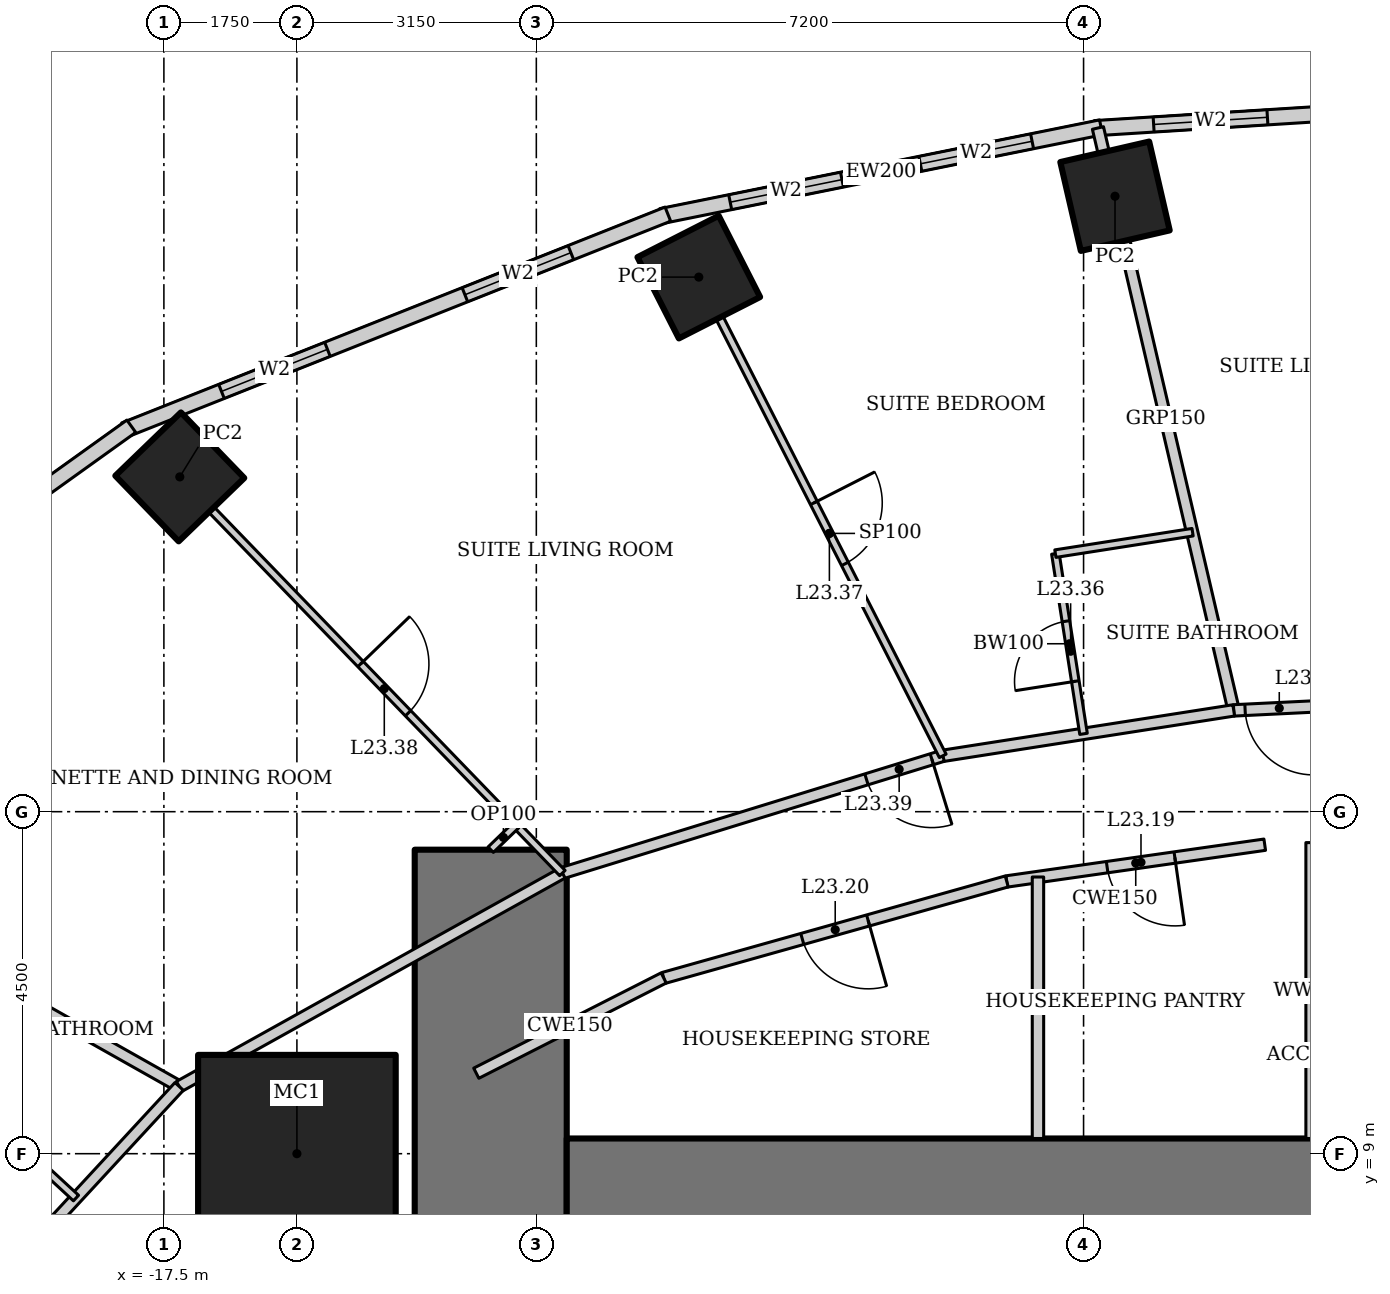
"""IFC4 building model, lengths in metres.
Left out: names, types, materials, properties, quantities, classifications, styles, units other than length and angle.
Written with IfcOpenShell. Run it as: python <this file> out.ifc"""

import sys

from ifc_helpers import new_model, si_unit, direction, frame, frame_2d, origin, origin_2d, place, context, subcontext, project, spatial, rectangle, hollow_rectangle, extrude, element, fill, save


model = new_model("IFC4")
c1 = context("Model", 3, precision=1e-05, world=origin(), true_north=direction((0.0, 1.0)))
c2 = subcontext(c1, "Body", "Model", "MODEL_VIEW")
j1 = project(units=[si_unit("LENGTHUNIT", "METRE"), si_unit("PLANEANGLEUNIT", "RADIAN")], contexts=[c1])
p1 = place(None, origin())
s1 = spatial("IfcSite", under=j1, at=p1, CompositionType="ELEMENT")
p2 = place(p1, origin())
s2 = spatial("IfcBuilding", under=s1, at=p2, CompositionType="ELEMENT")
p3 = place(p2, frame((0.0, 0.0, 98.2)))
s3 = spatial("IfcBuildingStorey", under=s2, at=p3, CompositionType="ELEMENT", Elevation=98.2)
p4 = place(p3, frame((-15.75, 9.0, 0.0), z_axis=(0.0, 0.0, 1.0), x_axis=(1.0, 0.0, 0.0)))
e1 = element("IfcColumn", 1, at=p4, inside=s3, PredefinedType="COLUMN", context=c2, shape_type="SweptSolid", body=[
    extrude(hollow_rectangle(XDim=2.6, YDim=2.6, WallThickness=0.13, at=origin_2d()), origin(), (0.0, 0.0, 1.0), 3.6),
])
for number, where, z_axis, x_axis in (
    (2, (-4.986, 21.598, 0.0), (0.0, 0.0, 1.0), (0.974, 0.225, 0.0)),
    (3, (-10.463, 20.534, 0.0), (0.0, 0.0, 1.0), (0.891, 0.454, 0.0)),
    (4, (-17.291, 17.905, 0.0), (0.0, 0.0, 1.0), (0.719, 0.695, 0.0)),
):
    element("IfcColumn", number, at=place(p3, frame(where, z_axis=z_axis, x_axis=x_axis)), inside=s3, PredefinedType="COLUMN", context=c2, shape_type="SweptSolid", body=[
        extrude(hollow_rectangle(XDim=1.2, YDim=1.2, WallThickness=0.1, at=origin_2d()), origin(), (0.0, 0.0, 1.0), 3.6),
    ])
p5 = place(p3, frame((-13.2, 13.0, 0.0), z_axis=(0.0, 0.0, 1.0), x_axis=(0.0, -1.0, 0.0)))
e5 = element("IfcWall", 5, at=p5, inside=s3, PredefinedType="SHEAR", context=c2, shape_type="SweptSolid", body=[
    extrude(rectangle(XDim=26.0, YDim=2.0, at=frame_2d((13.0, 0.0))), origin(), (0.0, 0.0, 1.0), 3.6),
])
p6 = place(p5, frame((12.1, 0.0, 0.0)))
e6 = element("IfcOpeningElement", 6, at=p6, cuts=e5, PredefinedType="OPENING", context=c2, shape_type="SweptSolid", body=[
    extrude(rectangle(XDim=1.8, YDim=2.1, at=frame_2d((0.9, 1.05))), frame((0.0, 1.01, 0.0), z_axis=(0.0, -1.0, 0.0), x_axis=(1.0, 0.0, 0.0)), (0.0, 0.0, 1.0), 2.02),
])
p7 = place(p3, frame((12.2, 8.0, 0.0), z_axis=(0.0, 0.0, 1.0), x_axis=(-1.0, 0.0, 0.0)))
e7 = element("IfcWall", 7, at=p7, inside=s3, PredefinedType="SHEAR", context=c2, shape_type="SweptSolid", body=[
    extrude(rectangle(XDim=24.4, YDim=2.4, at=frame_2d((12.2, 0.0))), origin(), (0.0, 0.0, 1.0), 3.6),
])
p8 = place(p3, frame((0.041, 22.827, 0.0), z_axis=(0.0, 0.0, 1.0), x_axis=(-0.998018582375, -0.062919863585, 0.0)))
e8 = element("IfcWall", 8, at=p8, inside=s3, PredefinedType="SOLIDWALL", context=c2, shape_type="SweptSolid", body=[
    extrude(rectangle(XDim=5.304, YDim=0.2, at=frame_2d((2.652, 0.0))), origin(), (0.0, 0.0, 1.0), 3.45),
])
p9 = place(p8, frame((0.776, 0.0, 0.5)))
e9 = element("IfcOpeningElement", 9, at=p9, cuts=e8, PredefinedType="OPENING", context=c2, shape_type="SweptSolid", body=[
    extrude(rectangle(XDim=1.5, YDim=2.2, at=frame_2d((0.75, 1.1))), frame((0.0, 0.11, 0.0), z_axis=(0.0, -1.0, 0.0), x_axis=(1.0, 0.0, 0.0)), (0.0, 0.0, 1.0), 0.22),
])
p10 = place(p8, frame((3.028, 0.0, 0.5)))
e10 = element("IfcOpeningElement", 10, at=p10, cuts=e8, PredefinedType="OPENING", context=c2, shape_type="SweptSolid", body=[
    extrude(rectangle(XDim=1.5, YDim=2.2, at=frame_2d((0.75, 1.1))), frame((0.0, 0.11, 0.0), z_axis=(0.0, -1.0, 0.0), x_axis=(1.0, 0.0, 0.0)), (0.0, 0.0, 1.0), 0.22),
])
p11 = place(p3, frame((-5.17, 22.504, 0.0), z_axis=(0.0, 0.0, 1.0), x_axis=(-0.980251657452, -0.197754110105, 0.0)))
e11 = element("IfcWall", 11, at=p11, inside=s3, PredefinedType="SOLIDWALL", context=c2, shape_type="SweptSolid", body=[
    extrude(rectangle(XDim=5.904, YDim=0.2, at=frame_2d((2.952, 0.0))), origin(), (0.0, 0.0, 1.0), 3.45),
])
p12 = place(p11, frame((0.926, 0.0, 0.5)))
e12 = element("IfcOpeningElement", 12, at=p12, cuts=e11, PredefinedType="OPENING", context=c2, shape_type="SweptSolid", body=[
    extrude(rectangle(XDim=1.5, YDim=2.2, at=frame_2d((0.75, 1.1))), frame((0.0, 0.11, 0.0), z_axis=(0.0, -1.0, 0.0), x_axis=(1.0, 0.0, 0.0)), (0.0, 0.0, 1.0), 0.22),
])
p13 = place(p11, frame((3.478, 0.0, 0.5)))
e13 = element("IfcOpeningElement", 13, at=p13, cuts=e11, PredefinedType="OPENING", context=c2, shape_type="SweptSolid", body=[
    extrude(rectangle(XDim=1.5, YDim=2.2, at=frame_2d((0.75, 1.1))), frame((0.0, 0.11, 0.0), z_axis=(0.0, -1.0, 0.0), x_axis=(1.0, 0.0, 0.0)), (0.0, 0.0, 1.0), 0.22),
])
p14 = place(p3, frame((-10.869, 21.363, 0.0), z_axis=(0.0, 0.0, 1.0), x_axis=(-0.929358351251, -0.369178892895, 0.0)))
e14 = element("IfcWall", 14, at=p14, inside=s3, PredefinedType="SOLIDWALL", context=c2, shape_type="SweptSolid", body=[
    extrude(rectangle(XDim=7.692, YDim=0.2, at=frame_2d((3.846, 0.0))), origin(), (0.0, 0.0, 1.0), 3.45),
])
p15 = place(p14, frame((1.373, 0.0, 0.5)))
e15 = element("IfcOpeningElement", 15, at=p15, cuts=e14, PredefinedType="OPENING", context=c2, shape_type="SweptSolid", body=[
    extrude(rectangle(XDim=1.5, YDim=2.2, at=frame_2d((0.75, 1.1))), frame((0.0, 0.11, 0.0), z_axis=(0.0, -1.0, 0.0), x_axis=(1.0, 0.0, 0.0)), (0.0, 0.0, 1.0), 0.22),
])
p16 = place(p14, frame((4.819, 0.0, 0.5)))
e16 = element("IfcOpeningElement", 16, at=p16, cuts=e14, PredefinedType="OPENING", context=c2, shape_type="SweptSolid", body=[
    extrude(rectangle(XDim=1.5, YDim=2.2, at=frame_2d((0.75, 1.1))), frame((0.0, 0.11, 0.0), z_axis=(0.0, -1.0, 0.0), x_axis=(1.0, 0.0, 0.0)), (0.0, 0.0, 1.0), 0.22),
])
p17 = place(p3, frame((-17.929, 18.572, 0.0), z_axis=(0.0, 0.0, 1.0), x_axis=(-0.812791321576, -0.582554948112, 0.0)))
e17 = element("IfcWall", 17, at=p17, inside=s3, PredefinedType="SOLIDWALL", context=c2, shape_type="SweptSolid", body=[
    extrude(rectangle(XDim=8.063, YDim=0.2, at=frame_2d((4.032, 0.0))), origin(), (0.0, 0.0, 1.0), 3.45),
])
p18 = place(p17, frame((1.466, 0.0, 0.5)))
e18 = element("IfcOpeningElement", 18, at=p18, cuts=e17, PredefinedType="OPENING", context=c2, shape_type="SweptSolid", body=[
    extrude(rectangle(XDim=1.5, YDim=2.2, at=frame_2d((0.75, 1.1))), frame((0.0, 0.11, 0.0), z_axis=(0.0, -1.0, 0.0), x_axis=(1.0, 0.0, 0.0)), (0.0, 0.0, 1.0), 0.22),
])
p19 = place(p17, frame((5.097, 0.0, 0.5)))
e19 = element("IfcOpeningElement", 19, at=p19, cuts=e17, PredefinedType="OPENING", context=c2, shape_type="SweptSolid", body=[
    extrude(rectangle(XDim=1.5, YDim=2.2, at=frame_2d((0.75, 1.1))), frame((0.0, 0.11, 0.0), z_axis=(0.0, -1.0, 0.0), x_axis=(1.0, 0.0, 0.0)), (0.0, 0.0, 1.0), 0.22),
])
p20 = place(p3, frame((-5.211, 22.496, 0.0), z_axis=(0.0, 0.0, 1.0), x_axis=(0.227056984461, -0.973881474209, 0.0)))
e20 = element("IfcWall", 20, at=p20, inside=s3, PredefinedType="PARTITIONING", context=c2, shape_type="SweptSolid", body=[
    extrude(rectangle(XDim=7.869, YDim=0.15, at=frame_2d((3.934, 0.0))), origin(), (0.0, 0.0, 1.0), 2.767),
])
p21 = place(p3, frame((-24.435, 13.909, 0.0), z_axis=(0.0, 0.0, 1.0), x_axis=(0.871075246657, -0.491149584813, 0.0)))
e21 = element("IfcWall", 21, at=p21, inside=s3, PredefinedType="PARTITIONING", context=c2, shape_type="SweptSolid", body=[
    extrude(rectangle(XDim=8.192, YDim=0.15, at=frame_2d((4.096, 0.0))), origin(), (0.0, 0.0, 1.0), 2.693),
])
p22 = place(p3, frame((0.0, 15.0, 0.0), z_axis=(0.0, 0.0, 1.0), x_axis=(-0.998809560203, -0.048779733975, 0.0)))
e22 = element("IfcWall", 22, at=p22, inside=s3, PredefinedType="PARTITIONING", context=c2, shape_type="SweptSolid", body=[
    extrude(rectangle(XDim=3.428, YDim=0.15, at=frame_2d((1.714, 0.0))), origin(), (0.0, 0.0, 1.0), 3.45),
])
p23 = place(p22, frame((2.378, 0.0, 0.0)))
e23 = element("IfcOpeningElement", 23, at=p23, cuts=e22, PredefinedType="OPENING", context=c2, shape_type="SweptSolid", body=[
    extrude(rectangle(XDim=0.9, YDim=2.1, at=frame_2d((0.45, 1.05))), frame((0.0, 0.085, 0.0), z_axis=(0.0, -1.0, 0.0), x_axis=(1.0, 0.0, 0.0)), (0.0, 0.0, 1.0), 0.17),
])
p24 = place(p3, frame((-3.424, 14.833, 0.0), z_axis=(0.0, 0.0, 1.0), x_axis=(-0.988015036573, -0.154357660987, 0.0)))
e24 = element("IfcWall", 24, at=p24, inside=s3, PredefinedType="PARTITIONING", context=c2, shape_type="SweptSolid", body=[
    extrude(rectangle(XDim=3.875, YDim=0.15, at=frame_2d((1.938, 0.0))), origin(), (0.0, 0.0, 1.0), 3.45),
])
p25 = place(p3, frame((-7.253, 14.235, 0.0), z_axis=(0.0, 0.0, 1.0), x_axis=(-0.955657956744, -0.294478980085, 0.0)))
e25 = element("IfcWall", 25, at=p25, inside=s3, PredefinedType="PARTITIONING", context=c2, shape_type="SweptSolid", body=[
    extrude(rectangle(XDim=5.236, YDim=0.15, at=frame_2d((2.618, 0.0))), origin(), (0.0, 0.0, 1.0), 3.45),
])
p26 = place(p25, frame((0.15, 0.0, 0.0)))
e26 = element("IfcOpeningElement", 26, at=p26, cuts=e25, PredefinedType="OPENING", context=c2, shape_type="SweptSolid", body=[
    extrude(rectangle(XDim=0.9, YDim=2.1, at=frame_2d((0.45, 1.05))), frame((0.0, 0.085, 0.0), z_axis=(0.0, -1.0, 0.0), x_axis=(1.0, 0.0, 0.0)), (0.0, 0.0, 1.0), 0.17),
])
p27 = place(p3, frame((-12.257, 12.693, 0.0), z_axis=(0.0, 0.0, 1.0), x_axis=(-0.873695910579, -0.486472461541, 0.0)))
e27 = element("IfcWall", 27, at=p27, inside=s3, PredefinedType="PARTITIONING", context=c2, shape_type="SweptSolid", body=[
    extrude(rectangle(XDim=5.771, YDim=0.15, at=frame_2d((2.885, 0.0))), origin(), (0.0, 0.0, 1.0), 3.45),
])
p28 = place(p3, frame((-17.299, 9.885, 0.0), z_axis=(0.0, 0.0, 1.0), x_axis=(-0.678641806296, -0.734469399463, 0.0)))
e28 = element("IfcWall", 28, at=p28, inside=s3, PredefinedType="PARTITIONING", context=c2, shape_type="SweptSolid", body=[
    extrude(rectangle(XDim=6.166, YDim=0.15, at=frame_2d((3.083, 0.0))), origin(), (0.0, 0.0, 1.0), 3.45),
])
p29 = place(p3, frame((-3.016, 13.066, 0.0), z_axis=(0.0, 0.0, 1.0), x_axis=(-0.990002114939, -0.14105251652, 0.0)))
e29 = element("IfcWall", 29, at=p29, inside=s3, PredefinedType="PARTITIONING", context=c2, shape_type="SweptSolid", body=[
    extrude(rectangle(XDim=3.429, YDim=0.15, at=frame_2d((1.714, 0.0))), origin(), (0.0, 0.0, 1.0), 3.45),
])
p30 = place(p29, frame((1.195, 0.0, 0.0)))
e30 = element("IfcOpeningElement", 30, at=p30, cuts=e29, PredefinedType="OPENING", context=c2, shape_type="SweptSolid", body=[
    extrude(rectangle(XDim=0.9, YDim=2.1, at=frame_2d((0.45, 1.05))), frame((0.0, 0.085, 0.0), z_axis=(0.0, -1.0, 0.0), x_axis=(1.0, 0.0, 0.0)), (0.0, 0.0, 1.0), 0.17),
])
p31 = place(p3, frame((-6.411, 12.582, 0.0), z_axis=(0.0, 0.0, 1.0), x_axis=(-0.962643729928, -0.270771211967, 0.0)))
e31 = element("IfcWall", 31, at=p31, inside=s3, PredefinedType="PARTITIONING", context=c2, shape_type="SweptSolid", body=[
    extrude(rectangle(XDim=4.688, YDim=0.15, at=frame_2d((2.344, 0.0))), origin(), (0.0, 0.0, 1.0), 3.45),
])
p32 = place(p31, frame((1.894, 0.0, 0.0)))
e32 = element("IfcOpeningElement", 32, at=p32, cuts=e31, PredefinedType="OPENING", context=c2, shape_type="SweptSolid", body=[
    extrude(rectangle(XDim=0.9, YDim=2.1, at=frame_2d((0.45, 1.05))), frame((0.0, 0.085, 0.0), z_axis=(0.0, -1.0, 0.0), x_axis=(1.0, 0.0, 0.0)), (0.0, 0.0, 1.0), 0.17),
])
p33 = place(p3, frame((-2.4, 9.2, 0.0), z_axis=(0.0, 0.0, 1.0), x_axis=(0.0, 1.0, 0.0)))
e33 = element("IfcWall", 33, at=p33, inside=s3, PredefinedType="SOLIDWALL", context=c2, shape_type="SweptSolid", body=[
    extrude(rectangle(XDim=3.893, YDim=0.15, at=frame_2d((1.947, 0.0))), origin(), (0.0, 0.0, 1.0), 2.767),
])
p34 = place(p3, frame((-6.0, 9.2, 0.0), z_axis=(0.0, 0.0, 1.0), x_axis=(0.0, 1.0, 0.0)))
e34 = element("IfcWall", 34, at=p34, inside=s3, PredefinedType="SOLIDWALL", context=c2, shape_type="SweptSolid", body=[
    extrude(rectangle(XDim=3.441, YDim=0.15, at=frame_2d((1.72, 0.0))), origin(), (0.0, 0.0, 1.0), 2.914),
])
p35 = place(p3, frame((-5.4, 14.524, 0.0), z_axis=(0.0, 0.0, 1.0), x_axis=(-0.154426532979, 0.988004274238, 0.0)))
e35 = element("IfcWall", 35, at=p35, inside=s3, PredefinedType="PARTITIONING", context=c2, shape_type="SweptSolid", body=[
    extrude(rectangle(XDim=2.4, YDim=0.1, at=frame_2d((1.2, 0.0))), origin(), (0.0, 0.0, 1.0), 3.45),
])
p36 = place(p35, frame((0.7, 0.0, 0.0)))
e36 = element("IfcOpeningElement", 36, at=p36, cuts=e35, PredefinedType="OPENING", context=c2, shape_type="SweptSolid", body=[
    extrude(rectangle(XDim=0.8, YDim=2.1, at=frame_2d((0.4, 1.05))), frame((0.0, 0.06, 0.0), z_axis=(0.0, -1.0, 0.0), x_axis=(1.0, 0.0, 0.0)), (0.0, 0.0, 1.0), 0.12),
])
p37 = place(p3, frame((-5.771, 16.895, 0.0), z_axis=(0.0, 0.0, 1.0), x_axis=(0.98801840204, 0.154336117711, 0.0)))
e37 = element("IfcWall", 37, at=p37, inside=s3, PredefinedType="PARTITIONING", context=c2, shape_type="SweptSolid", body=[
    extrude(rectangle(XDim=1.827, YDim=0.1, at=frame_2d((0.914, 0.0))), origin(), (0.0, 0.0, 1.0), 3.45),
])
p38 = place(p3, frame((-10.236, 20.088, 0.0), z_axis=(0.0, 0.0, 1.0), x_axis=(0.453993694696, -0.89100489627, 0.0)))
e38 = element("IfcWall", 38, at=p38, inside=s3, PredefinedType="PARTITIONING", context=c2, shape_type="SweptSolid", body=[
    extrude(rectangle(XDim=6.57, YDim=0.1, at=frame_2d((3.285, 0.0))), origin(), (0.0, 0.0, 1.0), 2.528),
])
p39 = place(p38, frame((2.835, 0.0, 0.0)))
e39 = element("IfcOpeningElement", 39, at=p39, cuts=e38, PredefinedType="OPENING", context=c2, shape_type="SweptSolid", body=[
    extrude(rectangle(XDim=0.9, YDim=2.1, at=frame_2d((0.45, 1.05))), frame((0.0, 0.06, 0.0), z_axis=(0.0, -1.0, 0.0), x_axis=(1.0, 0.0, 0.0)), (0.0, 0.0, 1.0), 0.12),
])
p40 = place(p3, frame((-16.944, 17.545, 0.0), z_axis=(0.0, 0.0, 1.0), x_axis=(0.694677175107, -0.719321640426, 0.0)))
e40 = element("IfcWall", 40, at=p40, inside=s3, PredefinedType="PARTITIONING", context=c2, shape_type="SweptSolid", body=[
    extrude(rectangle(XDim=6.746, YDim=0.1, at=frame_2d((3.373, 0.0))), origin(), (0.0, 0.0, 1.0), 2.528),
])
p41 = place(p40, frame((2.923, 0.0, 0.0)))
e41 = element("IfcOpeningElement", 41, at=p41, cuts=e40, PredefinedType="OPENING", context=c2, shape_type="SweptSolid", body=[
    extrude(rectangle(XDim=0.9, YDim=2.1, at=frame_2d((0.45, 1.05))), frame((0.0, 0.06, 0.0), z_axis=(0.0, -1.0, 0.0), x_axis=(1.0, 0.0, 0.0)), (0.0, 0.0, 1.0), 0.12),
])
p42 = place(p3, frame((-18.656, 8.416, 0.0), z_axis=(0.0, 0.0, 1.0), x_axis=(-0.73447964986, 0.678630712495, 0.0)))
e42 = element("IfcWall", 42, at=p42, inside=s3, PredefinedType="PARTITIONING", context=c2, shape_type="SweptSolid", body=[
    extrude(rectangle(XDim=2.4, YDim=0.1, at=frame_2d((1.2, 0.0))), origin(), (0.0, 0.0, 1.0), 3.45),
])
p43 = place(p42, frame((0.7, 0.0, 0.0)))
e43 = element("IfcOpeningElement", 43, at=p43, cuts=e42, PredefinedType="OPENING", context=c2, shape_type="SweptSolid", body=[
    extrude(rectangle(XDim=0.8, YDim=2.1, at=frame_2d((0.4, 1.05))), frame((0.0, 0.06, 0.0), z_axis=(0.0, -1.0, 0.0), x_axis=(1.0, 0.0, 0.0)), (0.0, 0.0, 1.0), 0.12),
])
p44 = place(p3, frame((-13.2, 13.0, 0.0), z_axis=(0.0, 0.0, 1.0), x_axis=(0.719347134512, 0.69465077562, 0.0)))
e44 = element("IfcWall", 44, at=p44, inside=s3, PredefinedType="PARTITIONING", context=c2, shape_type="SweptSolid", body=[
    extrude(rectangle(XDim=0.465, YDim=0.1, at=frame_2d((0.232, 0.0))), origin(), (0.0, 0.0, 1.0), 3.45),
])
p45 = place(p3, frame((-10.924, 11.312, 0.0), z_axis=(0.0, 0.0, 1.0), x_axis=(-0.891388152271, -0.453240732935, 0.0)))
e45 = element("IfcWall", 45, at=p45, inside=s3, PredefinedType="PARTITIONING", context=c2, shape_type="SweptSolid", body=[
    extrude(rectangle(XDim=2.766, YDim=0.15, at=frame_2d((1.383, 0.0))), origin(), (0.0, 0.0, 1.0), 3.45),
])
p46 = place(p10, origin())
e46 = element("IfcWindow", 46, at=p46, inside=s3, PartitioningType="SINGLE_PANEL", PredefinedType="WINDOW", context=c2, shape_type="SweptSolid", body=[
    extrude(rectangle(XDim=1.5, YDim=2.2, at=frame_2d((0.75, 1.1))), frame((0.0, 0.03, 0.0), z_axis=(0.0, -1.0, 0.0), x_axis=(1.0, 0.0, 0.0)), (0.0, 0.0, 1.0), 0.06),
])
fill(e10, e46)
p47 = place(p12, origin())
e47 = element("IfcWindow", 47, at=p47, inside=s3, PartitioningType="SINGLE_PANEL", PredefinedType="WINDOW", context=c2, shape_type="SweptSolid", body=[
    extrude(rectangle(XDim=1.5, YDim=2.2, at=frame_2d((0.75, 1.1))), frame((0.0, 0.03, 0.0), z_axis=(0.0, -1.0, 0.0), x_axis=(1.0, 0.0, 0.0)), (0.0, 0.0, 1.0), 0.06),
])
fill(e12, e47)
p48 = place(p13, origin())
e48 = element("IfcWindow", 48, at=p48, inside=s3, PartitioningType="SINGLE_PANEL", PredefinedType="WINDOW", context=c2, shape_type="SweptSolid", body=[
    extrude(rectangle(XDim=1.5, YDim=2.2, at=frame_2d((0.75, 1.1))), frame((0.0, 0.03, 0.0), z_axis=(0.0, -1.0, 0.0), x_axis=(1.0, 0.0, 0.0)), (0.0, 0.0, 1.0), 0.06),
])
fill(e13, e48)
p49 = place(p15, origin())
e49 = element("IfcWindow", 49, at=p49, inside=s3, PartitioningType="SINGLE_PANEL", PredefinedType="WINDOW", context=c2, shape_type="SweptSolid", body=[
    extrude(rectangle(XDim=1.5, YDim=2.2, at=frame_2d((0.75, 1.1))), frame((0.0, 0.03, 0.0), z_axis=(0.0, -1.0, 0.0), x_axis=(1.0, 0.0, 0.0)), (0.0, 0.0, 1.0), 0.06),
])
fill(e15, e49)
p50 = place(p16, origin())
e50 = element("IfcWindow", 50, at=p50, inside=s3, PartitioningType="SINGLE_PANEL", PredefinedType="WINDOW", context=c2, shape_type="SweptSolid", body=[
    extrude(rectangle(XDim=1.5, YDim=2.2, at=frame_2d((0.75, 1.1))), frame((0.0, 0.03, 0.0), z_axis=(0.0, -1.0, 0.0), x_axis=(1.0, 0.0, 0.0)), (0.0, 0.0, 1.0), 0.06),
])
fill(e16, e50)
p51 = place(p30, origin())
e51 = element("IfcDoor", 51, at=p51, inside=s3, OperationType="SINGLE_SWING_LEFT", PredefinedType="DOOR", context=c2, shape_type="SweptSolid", body=[
    extrude(rectangle(XDim=0.9, YDim=2.1, at=frame_2d((0.45, 1.05))), frame((0.0, 0.025, 0.0), z_axis=(0.0, -1.0, 0.0), x_axis=(1.0, 0.0, 0.0)), (0.0, 0.0, 1.0), 0.05),
])
fill(e30, e51)
p52 = place(p32, origin())
e52 = element("IfcDoor", 52, at=p52, inside=s3, OperationType="SINGLE_SWING_LEFT", PredefinedType="DOOR", context=c2, shape_type="SweptSolid", body=[
    extrude(rectangle(XDim=0.9, YDim=2.1, at=frame_2d((0.45, 1.05))), frame((0.0, 0.025, 0.0), z_axis=(0.0, -1.0, 0.0), x_axis=(1.0, 0.0, 0.0)), (0.0, 0.0, 1.0), 0.05),
])
fill(e32, e52)
p53 = place(p23, origin())
e53 = element("IfcDoor", 53, at=p53, inside=s3, OperationType="SINGLE_SWING_LEFT", PredefinedType="DOOR", context=c2, shape_type="SweptSolid", body=[
    extrude(rectangle(XDim=0.9, YDim=2.1, at=frame_2d((0.45, 1.05))), frame((0.0, 0.025, 0.0), z_axis=(0.0, -1.0, 0.0), x_axis=(1.0, 0.0, 0.0)), (0.0, 0.0, 1.0), 0.05),
])
fill(e23, e53)
p54 = place(p36, origin())
e54 = element("IfcDoor", 54, at=p54, inside=s3, OperationType="SINGLE_SWING_LEFT", PredefinedType="DOOR", context=c2, shape_type="SweptSolid", body=[
    extrude(rectangle(XDim=0.8, YDim=2.1, at=frame_2d((0.4, 1.05))), frame((0.0, 0.025, 0.0), z_axis=(0.0, -1.0, 0.0), x_axis=(1.0, 0.0, 0.0)), (0.0, 0.0, 1.0), 0.05),
])
fill(e36, e54)
p55 = place(p39, origin())
e55 = element("IfcDoor", 55, at=p55, inside=s3, OperationType="SINGLE_SWING_LEFT", PredefinedType="DOOR", context=c2, shape_type="SweptSolid", body=[
    extrude(rectangle(XDim=0.9, YDim=2.1, at=frame_2d((0.45, 1.05))), frame((0.0, 0.025, 0.0), z_axis=(0.0, -1.0, 0.0), x_axis=(1.0, 0.0, 0.0)), (0.0, 0.0, 1.0), 0.05),
])
fill(e39, e55)
p56 = place(p41, origin())
e56 = element("IfcDoor", 56, at=p56, inside=s3, OperationType="SINGLE_SWING_LEFT", PredefinedType="DOOR", context=c2, shape_type="SweptSolid", body=[
    extrude(rectangle(XDim=0.9, YDim=2.1, at=frame_2d((0.45, 1.05))), frame((0.0, 0.025, 0.0), z_axis=(0.0, -1.0, 0.0), x_axis=(1.0, 0.0, 0.0)), (0.0, 0.0, 1.0), 0.05),
])
fill(e41, e56)
p57 = place(p26, origin())
e57 = element("IfcDoor", 57, at=p57, inside=s3, OperationType="SINGLE_SWING_LEFT", PredefinedType="DOOR", context=c2, shape_type="SweptSolid", body=[
    extrude(rectangle(XDim=0.9, YDim=2.1, at=frame_2d((0.45, 1.05))), frame((0.0, 0.025, 0.0), z_axis=(0.0, -1.0, 0.0), x_axis=(1.0, 0.0, 0.0)), (0.0, 0.0, 1.0), 0.05),
])
fill(e26, e57)
save(model, sys.argv[1])
